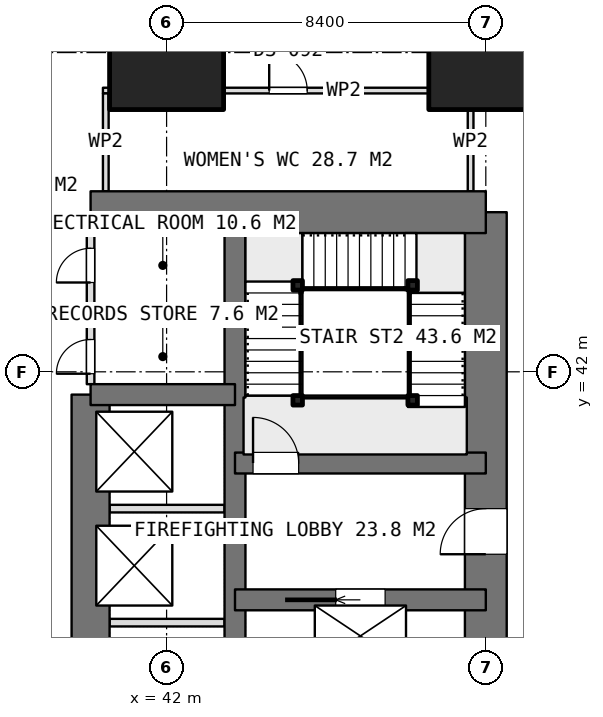
"""IFC4 building model, lengths in metres.
Left out: names, types, materials, properties, quantities, classifications, styles, units other than length and angle.
Written with IfcOpenShell. Run it as: python <this file> out.ifc"""

import sys

from ifc_helpers import new_model, si_unit, direction, frame, frame_2d, origin, origin_2d, place, context, subcontext, project, spatial, rectangle, extrude, element, fill, save


model = new_model("IFC4")
c1 = context("Model", 3, precision=1e-05, world=origin(), true_north=direction((0.0, 1.0)))
c2 = subcontext(c1, "Body", "Model", "MODEL_VIEW")
j1 = project(units=[si_unit("LENGTHUNIT", "METRE"), si_unit("PLANEANGLEUNIT", "RADIAN")], contexts=[c1])
p1 = place(None, origin())
s1 = spatial("IfcSite", under=j1, at=p1, CompositionType="ELEMENT")
p2 = place(p1, origin())
s2 = spatial("IfcBuilding", under=s1, at=p2, CompositionType="ELEMENT")
p3 = place(p2, frame((0.0, 0.0, 81.65)))
s3 = spatial("IfcBuildingStorey", under=s2, at=p3, CompositionType="ELEMENT", Elevation=81.65)
p4 = place(p3, frame((40.0, 46.2, 0.0), z_axis=(0.0, 0.0, 1.0), x_axis=(1.0, 0.0, 0.0)))
e1 = element("IfcWall", 1, at=p4, inside=s3, PredefinedType="SHEAR", context=c2, shape_type="SweptSolid", body=[
    extrude(rectangle(XDim=10.4, YDim=1.1, at=frame_2d((5.2, 0.0))), origin(), (0.0, 0.0, 1.0), 3.75),
])
p5 = place(p3, frame((50.4, 21.0, 0.0), z_axis=(0.0, 0.0, 1.0), x_axis=(0.0, 1.0, 0.0)))
e2 = element("IfcWall", 2, at=p5, inside=s3, PredefinedType="SHEAR", context=c2, shape_type="SweptSolid", body=[
    extrude(rectangle(XDim=25.2, YDim=1.1, at=frame_2d((12.6, 0.0))), origin(), (0.0, 0.0, 1.0), 3.75),
])
p6 = place(p5, frame((16.2, 0.0, 0.0)))
e3 = element("IfcOpeningElement", 3, at=p6, cuts=e2, PredefinedType="OPENING", context=c2, shape_type="SweptSolid", body=[
    extrude(rectangle(XDim=1.2, YDim=2.1, at=frame_2d((0.6, 1.05))), frame((0.0, 0.56, 0.0), z_axis=(0.0, -1.0, 0.0), x_axis=(1.0, 0.0, 0.0)), (0.0, 0.0, 1.0), 1.12),
])
p7 = place(p5, frame((10.05, 0.0, 0.0)))
e4 = element("IfcOpeningElement", 4, at=p7, cuts=e2, PredefinedType="OPENING", context=c2, shape_type="SweptSolid", body=[
    extrude(rectangle(XDim=0.9, YDim=2.1, at=frame_2d((0.45, 1.05))), frame((0.0, 0.56, 0.0), z_axis=(0.0, -1.0, 0.0), x_axis=(1.0, 0.0, 0.0)), (0.0, 0.0, 1.0), 1.12),
])
p8 = place(p5, frame((7.45, 0.0, 0.0)))
e5 = element("IfcOpeningElement", 5, at=p8, cuts=e2, PredefinedType="OPENING", context=c2, shape_type="SweptSolid", body=[
    extrude(rectangle(XDim=0.9, YDim=2.1, at=frame_2d((0.45, 1.05))), frame((0.0, 0.56, 0.0), z_axis=(0.0, -1.0, 0.0), x_axis=(1.0, 0.0, 0.0)), (0.0, 0.0, 1.0), 1.12),
])
p9 = place(p5, frame((0.75, 0.0, 0.0)))
e6 = element("IfcOpeningElement", 6, at=p9, cuts=e2, PredefinedType="OPENING", context=c2, shape_type="SweptSolid", body=[
    extrude(rectangle(XDim=1.2, YDim=2.1, at=frame_2d((0.6, 1.05))), frame((0.0, 0.56, 0.0), z_axis=(0.0, -1.0, 0.0), x_axis=(1.0, 0.0, 0.0)), (0.0, 0.0, 1.0), 1.12),
])
p10 = place(p3, frame((43.8, 21.0, 0.0), z_axis=(0.0, 0.0, 1.0), x_axis=(0.0, 1.0, 0.0)))
e7 = element("IfcWall", 7, at=p10, inside=s3, PredefinedType="SHEAR", context=c2, shape_type="SweptSolid", body=[
    extrude(rectangle(XDim=25.2, YDim=0.55, at=frame_2d((12.6, 0.0))), origin(), (0.0, 0.0, 1.0), 3.75),
])
p11 = place(p3, frame((40.0, 23.4, 0.0), z_axis=(0.0, 0.0, 1.0), x_axis=(0.0, 1.0, 0.0)))
e8 = element("IfcWall", 8, at=p11, inside=s3, PredefinedType="SHEAR", context=c2, shape_type="SweptSolid", body=[
    extrude(rectangle(XDim=18.0, YDim=1.0, at=frame_2d((9.0, 0.0))), origin(), (0.0, 0.0, 1.0), 3.75),
])
p12 = place(p3, frame((40.0, 41.4, 0.0), z_axis=(0.0, 0.0, 1.0), x_axis=(1.0, 0.0, 0.0)))
e9 = element("IfcWall", 9, at=p12, inside=s3, PredefinedType="SHEAR", context=c2, shape_type="SweptSolid", body=[
    extrude(rectangle(XDim=3.8, YDim=0.55, at=frame_2d((1.9, 0.0))), origin(), (0.0, 0.0, 1.0), 3.75),
])
p13 = place(p3, frame((43.8, 36.0, 0.0), z_axis=(0.0, 0.0, 1.0), x_axis=(1.0, 0.0, 0.0)))
e10 = element("IfcWall", 10, at=p13, inside=s3, PredefinedType="SHEAR", context=c2, shape_type="SweptSolid", body=[
    extrude(rectangle(XDim=6.6, YDim=0.55, at=frame_2d((3.3, 0.0))), origin(), (0.0, 0.0, 1.0), 3.75),
])
p14 = place(p13, frame((2.65, 0.0, 0.0)))
e11 = element("IfcOpeningElement", 11, at=p14, cuts=e10, PredefinedType="OPENING", context=c2, shape_type="SweptSolid", body=[
    extrude(rectangle(XDim=1.3, YDim=2.1, at=frame_2d((0.65, 1.05))), frame((0.0, 0.285, 0.0), z_axis=(0.0, -1.0, 0.0), x_axis=(1.0, 0.0, 0.0)), (0.0, 0.0, 1.0), 0.57),
])
p15 = place(p3, frame((43.8, 39.6, 0.0), z_axis=(0.0, 0.0, 1.0), x_axis=(1.0, 0.0, 0.0)))
e12 = element("IfcWall", 12, at=p15, inside=s3, PredefinedType="SHEAR", context=c2, shape_type="SweptSolid", body=[
    extrude(rectangle(XDim=6.6, YDim=0.55, at=frame_2d((3.3, 0.0))), origin(), (0.0, 0.0, 1.0), 3.75),
])
p16 = place(p15, frame((0.475, 0.0, 0.0)))
e13 = element("IfcOpeningElement", 13, at=p16, cuts=e12, PredefinedType="OPENING", context=c2, shape_type="SweptSolid", body=[
    extrude(rectangle(XDim=1.2, YDim=2.1, at=frame_2d((0.6, 1.05))), frame((0.0, 0.285, 0.0), z_axis=(0.0, -1.0, 0.0), x_axis=(1.0, 0.0, 0.0)), (0.0, 0.0, 1.0), 0.57),
])
for number, where, z_axis, x_axis in (
    (14, (42.0, 50.4, 0.0), (0.0, 0.0, 1.0), (1.0, 0.0, 0.0)),
    (15, (50.4, 50.4, 0.0), (0.0, 0.0, 1.0), (1.0, 0.0, 0.0)),
):
    element("IfcColumn", number, at=place(p3, frame(where, z_axis=z_axis, x_axis=x_axis)), inside=s3, PredefinedType="COLUMN", context=c2, shape_type="SweptSolid", body=[
        extrude(rectangle(XDim=3.0, YDim=3.0, at=origin_2d()), origin(), (0.0, 0.0, 1.0), 3.75),
    ])
for number, where, z_axis, x_axis in (
    (16, (40.5, 35.4, 0.0), (0.0, 0.0, 1.0), (1.0, 0.0, 0.0)),
    (17, (40.5, 38.4, 0.0), (0.0, 0.0, 1.0), (1.0, 0.0, 0.0)),
):
    element("IfcWall", number, at=place(p3, frame(where, z_axis=z_axis, x_axis=x_axis)), inside=s3, PredefinedType="PARTITIONING", context=c2, shape_type="SweptSolid", body=[
        extrude(rectangle(XDim=3.025, YDim=0.2, at=frame_2d((1.512, 0.0))), origin(), (0.0, 0.0, 1.0), 3.4),
    ])
p17 = place(p3, frame((40.0, 41.675, 0.0), z_axis=(0.0, 0.0, 1.0), x_axis=(0.0, 1.0, 0.0)))
e18 = element("IfcWall", 18, at=p17, inside=s3, PredefinedType="PARTITIONING", context=c2, shape_type="SweptSolid", body=[
    extrude(rectangle(XDim=3.975, YDim=0.2, at=frame_2d((1.987, 0.0))), origin(), (0.0, 0.0, 1.0), 3.4),
])
p18 = place(p17, frame((2.675, 0.0, 0.0)))
e19 = element("IfcOpeningElement", 19, at=p18, cuts=e18, PredefinedType="OPENING", context=c2, shape_type="SweptSolid", body=[
    extrude(rectangle(XDim=0.9, YDim=2.1, at=frame_2d((0.45, 1.05))), frame((0.0, 0.11, 0.0), z_axis=(0.0, -1.0, 0.0), x_axis=(1.0, 0.0, 0.0)), (0.0, 0.0, 1.0), 0.22),
])
p19 = place(p17, frame((0.275, 0.0, 0.0)))
e20 = element("IfcOpeningElement", 20, at=p19, cuts=e18, PredefinedType="OPENING", context=c2, shape_type="SweptSolid", body=[
    extrude(rectangle(XDim=0.9, YDim=2.1, at=frame_2d((0.45, 1.05))), frame((0.0, 0.11, 0.0), z_axis=(0.0, -1.0, 0.0), x_axis=(1.0, 0.0, 0.0)), (0.0, 0.0, 1.0), 0.22),
])
p20 = place(p3, frame((40.0, 43.4, 0.0), z_axis=(0.0, 0.0, 1.0), x_axis=(1.0, 0.0, 0.0)))
e21 = element("IfcWall", 21, at=p20, inside=s3, PredefinedType="PARTITIONING", context=c2, shape_type="SweptSolid", body=[
    extrude(rectangle(XDim=3.525, YDim=0.2, at=frame_2d((1.762, 0.0))), origin(), (0.0, 0.0, 1.0), 3.4),
])
p21 = place(p3, frame((40.325, 49.4, 0.0), z_axis=(0.0, 0.0, 1.0), x_axis=(1.0, 0.0, 0.0)))
e22 = element("IfcWall", 22, at=p21, inside=s3, PredefinedType="PARTITIONING", context=c2, shape_type="SweptSolid", body=[
    extrude(rectangle(XDim=9.75, YDim=0.15, at=frame_2d((4.875, 0.0))), origin(), (0.0, 0.0, 1.0), 3.4),
])
p22 = place(p21, frame((4.375, 0.0, 0.0)))
e23 = element("IfcOpeningElement", 23, at=p22, cuts=e22, PredefinedType="OPENING", context=c2, shape_type="SweptSolid", body=[
    extrude(rectangle(XDim=1.0, YDim=2.1, at=frame_2d((0.5, 1.05))), frame((0.0, 0.085, 0.0), z_axis=(0.0, -1.0, 0.0), x_axis=(1.0, 0.0, 0.0)), (0.0, 0.0, 1.0), 0.17),
])
for number, where, z_axis, x_axis in (
    (24, (40.4, 46.75, 0.0), (0.0, 0.0, 1.0), (0.0, 1.0, 0.0)),
    (25, (50.0, 46.75, 0.0), (0.0, 0.0, 1.0), (0.0, 1.0, 0.0)),
):
    element("IfcWall", number, at=place(p3, frame(where, z_axis=z_axis, x_axis=x_axis)), inside=s3, PredefinedType="PARTITIONING", context=c2, shape_type="SweptSolid", body=[
        extrude(rectangle(XDim=2.575, YDim=0.15, at=frame_2d((1.288, 0.0))), origin(), (0.0, 0.0, 1.0), 3.4),
    ])
for number, where, z_axis, x_axis in (
    (26, (45.45, 41.25, 0.0), (0.0, 0.0, 1.0), (1.0, 0.0, 0.0)),
    (27, (45.45, 44.275, 0.0), (0.0, 0.0, 1.0), (1.0, 0.0, 0.0)),
    (28, (48.475, 44.275, 0.0), (0.0, 0.0, 1.0), (1.0, 0.0, 0.0)),
    (29, (48.475, 41.25, 0.0), (0.0, 0.0, 1.0), (1.0, 0.0, 0.0)),
):
    element("IfcColumn", number, at=place(p3, frame(where, z_axis=z_axis, x_axis=x_axis)), inside=s3, PredefinedType="COLUMN", context=c2, shape_type="SweptSolid", body=[
        extrude(rectangle(XDim=0.25, YDim=0.25, at=origin_2d()), origin(), (0.0, 0.0, 1.0), 3.75),
    ])
p23 = place(p6, origin())
e30 = element("IfcDoor", 30, at=p23, inside=s3, OperationType="SINGLE_SWING_LEFT", PredefinedType="DOOR", context=c2, shape_type="SweptSolid", body=[
    extrude(rectangle(XDim=1.2, YDim=2.1, at=frame_2d((0.6, 1.05))), frame((0.0, 0.025, 0.0), z_axis=(0.0, -1.0, 0.0), x_axis=(1.0, 0.0, 0.0)), (0.0, 0.0, 1.0), 0.05),
])
fill(e3, e30)
p24 = place(p18, origin())
e31 = element("IfcDoor", 31, at=p24, inside=s3, OperationType="SINGLE_SWING_LEFT", PredefinedType="DOOR", context=c2, shape_type="SweptSolid", body=[
    extrude(rectangle(XDim=0.9, YDim=2.1, at=frame_2d((0.45, 1.05))), frame((0.0, 0.025, 0.0), z_axis=(0.0, -1.0, 0.0), x_axis=(1.0, 0.0, 0.0)), (0.0, 0.0, 1.0), 0.05),
])
fill(e19, e31)
p25 = place(p19, origin())
e32 = element("IfcDoor", 32, at=p25, inside=s3, OperationType="SINGLE_SWING_LEFT", PredefinedType="DOOR", context=c2, shape_type="SweptSolid", body=[
    extrude(rectangle(XDim=0.9, YDim=2.1, at=frame_2d((0.45, 1.05))), frame((0.0, 0.025, 0.0), z_axis=(0.0, -1.0, 0.0), x_axis=(1.0, 0.0, 0.0)), (0.0, 0.0, 1.0), 0.05),
])
fill(e20, e32)
p26 = place(p14, origin())
e33 = element("IfcDoor", 33, at=p26, inside=s3, OperationType="SLIDING_TO_LEFT", PredefinedType="USERDEFINED", context=c2, shape_type="SweptSolid", body=[
    extrude(rectangle(XDim=1.3, YDim=2.1, at=frame_2d((0.65, 1.05))), frame((0.0, 0.025, 0.0), z_axis=(0.0, -1.0, 0.0), x_axis=(1.0, 0.0, 0.0)), (0.0, 0.0, 1.0), 0.05),
])
fill(e11, e33)
p27 = place(p22, origin())
e34 = element("IfcDoor", 34, at=p27, inside=s3, OperationType="SINGLE_SWING_LEFT", PredefinedType="DOOR", context=c2, shape_type="SweptSolid", body=[
    extrude(rectangle(XDim=1.0, YDim=2.1, at=frame_2d((0.5, 1.05))), frame((0.0, 0.025, 0.0), z_axis=(0.0, -1.0, 0.0), x_axis=(1.0, 0.0, 0.0)), (0.0, 0.0, 1.0), 0.05),
])
fill(e23, e34)
p28 = place(p16, origin())
e35 = element("IfcDoor", 35, at=p28, inside=s3, OperationType="SINGLE_SWING_RIGHT", PredefinedType="DOOR", context=c2, shape_type="SweptSolid", body=[
    extrude(rectangle(XDim=1.2, YDim=2.1, at=frame_2d((0.6, 1.05))), frame((0.0, 0.025, 0.0), z_axis=(0.0, -1.0, 0.0), x_axis=(1.0, 0.0, 0.0)), (0.0, 0.0, 1.0), 0.05),
])
fill(e13, e35)
save(model, sys.argv[1])
